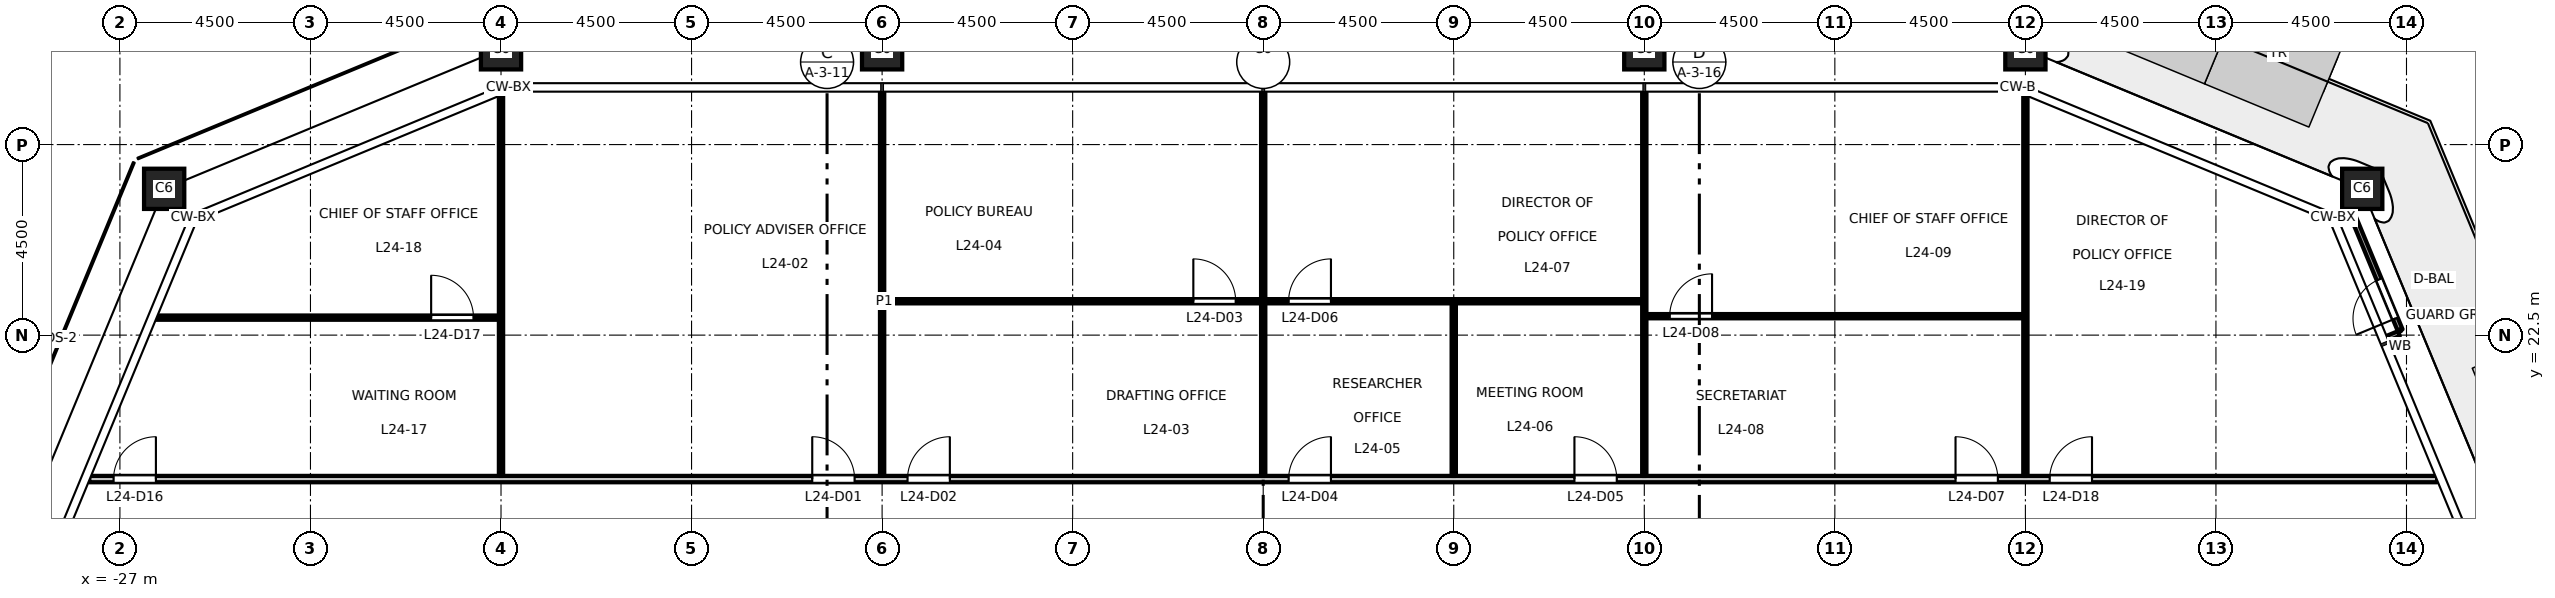
"""IFC4 building model, lengths in metres.
Left out: names, types, materials, properties, quantities, classifications, styles, units other than length and angle.
Written with IfcOpenShell. Run it as: python <this file> out.ifc"""

import sys

from ifc_helpers import new_model, si_unit, direction, frame, frame_2d, origin, origin_2d, place, context, subcontext, project, spatial, rectangle, hollow_rectangle, extrude, element, fill, save


model = new_model("IFC4")
c1 = context("Model", 3, precision=1e-05, world=origin(), true_north=direction((0.0, 1.0)))
c2 = subcontext(c1, "Body", "Model", "MODEL_VIEW")
j1 = project(units=[si_unit("LENGTHUNIT", "METRE"), si_unit("PLANEANGLEUNIT", "RADIAN")], contexts=[c1])
p1 = place(None, origin())
s1 = spatial("IfcSite", under=j1, at=p1, CompositionType="ELEMENT")
p2 = place(p1, origin())
s2 = spatial("IfcBuilding", under=s1, at=p2, CompositionType="ELEMENT")
p3 = place(p2, frame((0.0, 0.0, 113.7)))
s3 = spatial("IfcBuildingStorey", under=s2, at=p3, CompositionType="ELEMENT", Elevation=113.7)
for number, where, z_axis, x_axis in (
    (1, (25.955, 25.955, 0.0), (0.0, 0.0, 1.0), (1.0, 0.0, 0.0)),
    (2, (18.0, 29.25, 0.0), (0.0, 0.0, 1.0), (1.0, 0.0, 0.0)),
    (3, (9.0, 29.25, 0.0), (0.0, 0.0, 1.0), (1.0, 0.0, 0.0)),
    (4, (0.0, 29.25, 0.0), (0.0, 0.0, 1.0), (1.0, 0.0, 0.0)),
    (5, (-9.0, 29.25, 0.0), (0.0, 0.0, 1.0), (1.0, 0.0, 0.0)),
    (6, (-18.0, 29.25, 0.0), (0.0, 0.0, 1.0), (1.0, 0.0, 0.0)),
    (7, (-25.955, 25.955, 0.0), (0.0, 0.0, 1.0), (1.0, 0.0, 0.0)),
):
    element("IfcColumn", number, at=place(p3, frame(where, z_axis=z_axis, x_axis=x_axis)), inside=s3, PredefinedType="COLUMN", context=c2, shape_type="SweptSolid", body=[
        extrude(hollow_rectangle(XDim=0.95, YDim=0.95, WallThickness=0.055, at=origin_2d()), origin(), (0.0, 0.0, 1.0), 4.5),
    ])
for number, where, z_axis, x_axis in (
    (8, (26.551, 22.425, 0.0), (0.0, 0.0, 1.0), (0.924, 0.382, 0.0)),
    (9, (25.421, 25.153, 0.0), (0.0, 0.0, 1.0), (0.924, 0.383, 0.0)),
):
    element("IfcWall", number, at=place(p3, frame(where, z_axis=z_axis, x_axis=x_axis)), inside=s3, PredefinedType="STANDARD", context=c2, shape_type="SweptSolid", body=[
        extrude(rectangle(XDim=0.29, YDim=0.12, at=frame_2d((0.145, 0.0))), origin(), (0.0, 0.0, 1.0), 4.35),
    ])
p4 = place(p3, frame((26.852, 22.615, 0.0), z_axis=(0.0, 0.0, 1.0), x_axis=(-0.382708655389, 0.923869084389, 0.0)))
e10 = element("IfcWall", 10, at=p4, inside=s3, PredefinedType="STANDARD", context=c2, shape_type="SweptSolid", body=[
    extrude(rectangle(XDim=3.102, YDim=0.12, at=frame_2d((1.551, 0.0))), origin(), (0.0, 0.0, 1.0), 4.35),
])
p5 = place(p4, frame((0.3, 0.0, 0.0)))
e11 = element("IfcOpeningElement", 11, at=p5, cuts=e10, PredefinedType="OPENING", context=c2, shape_type="SweptSolid", body=[
    extrude(rectangle(XDim=1.0, YDim=2.4, at=frame_2d((0.5, 1.2))), frame((0.0, 0.07, 0.0), z_axis=(0.0, -1.0, 0.0), x_axis=(1.0, 0.0, 0.0)), (0.0, 0.0, 1.0), 0.14),
])
p6 = place(p3, frame((-27.723, 19.1, 0.0), z_axis=(0.0, 0.0, 1.0), x_axis=(1.0, 0.0, 0.0)))
e12 = element("IfcWall", 12, at=p6, inside=s3, PredefinedType="PARTITIONING", context=c2, shape_type="SweptSolid", body=[
    extrude(rectangle(XDim=55.446, YDim=0.15, at=frame_2d((27.723, 0.0))), origin(), (0.0, 0.0, 1.0), 4.35),
])
p7 = place(p6, frame((17.073, 0.0, 0.0)))
e13 = element("IfcOpeningElement", 13, at=p7, cuts=e12, PredefinedType="OPENING", context=c2, shape_type="SweptSolid", body=[
    extrude(rectangle(XDim=1.0, YDim=2.1, at=frame_2d((0.5, 1.05))), frame((0.0, 0.085, 0.0), z_axis=(0.0, -1.0, 0.0), x_axis=(1.0, 0.0, 0.0)), (0.0, 0.0, 1.0), 0.17),
])
p8 = place(p6, frame((19.323, 0.0, 0.0)))
e14 = element("IfcOpeningElement", 14, at=p8, cuts=e12, PredefinedType="OPENING", context=c2, shape_type="SweptSolid", body=[
    extrude(rectangle(XDim=1.0, YDim=2.1, at=frame_2d((0.5, 1.05))), frame((0.0, 0.085, 0.0), z_axis=(0.0, -1.0, 0.0), x_axis=(1.0, 0.0, 0.0)), (0.0, 0.0, 1.0), 0.17),
])
p9 = place(p6, frame((28.323, 0.0, 0.0)))
e15 = element("IfcOpeningElement", 15, at=p9, cuts=e12, PredefinedType="OPENING", context=c2, shape_type="SweptSolid", body=[
    extrude(rectangle(XDim=1.0, YDim=2.1, at=frame_2d((0.5, 1.05))), frame((0.0, 0.085, 0.0), z_axis=(0.0, -1.0, 0.0), x_axis=(1.0, 0.0, 0.0)), (0.0, 0.0, 1.0), 0.17),
])
p10 = place(p6, frame((35.073, 0.0, 0.0)))
e16 = element("IfcOpeningElement", 16, at=p10, cuts=e12, PredefinedType="OPENING", context=c2, shape_type="SweptSolid", body=[
    extrude(rectangle(XDim=1.0, YDim=2.1, at=frame_2d((0.5, 1.05))), frame((0.0, 0.085, 0.0), z_axis=(0.0, -1.0, 0.0), x_axis=(1.0, 0.0, 0.0)), (0.0, 0.0, 1.0), 0.17),
])
p11 = place(p6, frame((44.073, 0.0, 0.0)))
e17 = element("IfcOpeningElement", 17, at=p11, cuts=e12, PredefinedType="OPENING", context=c2, shape_type="SweptSolid", body=[
    extrude(rectangle(XDim=1.0, YDim=2.1, at=frame_2d((0.5, 1.05))), frame((0.0, 0.085, 0.0), z_axis=(0.0, -1.0, 0.0), x_axis=(1.0, 0.0, 0.0)), (0.0, 0.0, 1.0), 0.17),
])
p12 = place(p6, frame((0.573, 0.0, 0.0)))
e18 = element("IfcOpeningElement", 18, at=p12, cuts=e12, PredefinedType="OPENING", context=c2, shape_type="SweptSolid", body=[
    extrude(rectangle(XDim=1.0, YDim=2.1, at=frame_2d((0.5, 1.05))), frame((0.0, 0.085, 0.0), z_axis=(0.0, -1.0, 0.0), x_axis=(1.0, 0.0, 0.0)), (0.0, 0.0, 1.0), 0.17),
])
p13 = place(p6, frame((46.296, 0.0, 0.0)))
e19 = element("IfcOpeningElement", 19, at=p13, cuts=e12, PredefinedType="OPENING", context=c2, shape_type="SweptSolid", body=[
    extrude(rectangle(XDim=1.0, YDim=2.1, at=frame_2d((0.5, 1.05))), frame((0.0, 0.085, 0.0), z_axis=(0.0, -1.0, 0.0), x_axis=(1.0, 0.0, 0.0)), (0.0, 0.0, 1.0), 0.17),
])
p14 = place(p3, frame((-26.143, 22.913, 0.0), z_axis=(0.0, 0.0, 1.0), x_axis=(1.0, 0.0, 0.0)))
e20 = element("IfcWall", 20, at=p14, inside=s3, PredefinedType="PARTITIONING", context=c2, shape_type="SweptSolid", body=[
    extrude(rectangle(XDim=8.093, YDim=0.1, at=frame_2d((4.046, 0.0))), origin(), (0.0, 0.0, 1.0), 4.35),
])
p15 = place(p14, frame((6.493, 0.0, 0.0)))
e21 = element("IfcOpeningElement", 21, at=p15, cuts=e20, PredefinedType="OPENING", context=c2, shape_type="SweptSolid", body=[
    extrude(rectangle(XDim=1.0, YDim=2.1, at=frame_2d((0.5, 1.05))), frame((0.0, 0.06, 0.0), z_axis=(0.0, -1.0, 0.0), x_axis=(1.0, 0.0, 0.0)), (0.0, 0.0, 1.0), 0.12),
])
p16 = place(p3, frame((9.05, 22.947, 0.0), z_axis=(0.0, 0.0, 1.0), x_axis=(1.0, 0.0, 0.0)))
e22 = element("IfcWall", 22, at=p16, inside=s3, PredefinedType="PARTITIONING", context=c2, shape_type="SweptSolid", body=[
    extrude(rectangle(XDim=8.9, YDim=0.1, at=frame_2d((4.45, 0.0))), origin(), (0.0, 0.0, 1.0), 4.35),
])
p17 = place(p16, frame((0.55, 0.0, 0.0)))
e23 = element("IfcOpeningElement", 23, at=p17, cuts=e22, PredefinedType="OPENING", context=c2, shape_type="SweptSolid", body=[
    extrude(rectangle(XDim=1.0, YDim=2.1, at=frame_2d((0.5, 1.05))), frame((0.0, 0.06, 0.0), z_axis=(0.0, -1.0, 0.0), x_axis=(1.0, 0.0, 0.0)), (0.0, 0.0, 1.0), 0.12),
])
p18 = place(p3, frame((-8.95, 23.3, 0.0), z_axis=(0.0, 0.0, 1.0), x_axis=(1.0, 0.0, 0.0)))
e24 = element("IfcWall", 24, at=p18, inside=s3, PredefinedType="PARTITIONING", context=c2, shape_type="SweptSolid", body=[
    extrude(rectangle(XDim=17.9, YDim=0.1, at=frame_2d((8.95, 0.0))), origin(), (0.0, 0.0, 1.0), 4.35),
])
p19 = place(p18, frame((7.3, 0.0, 0.0)))
e25 = element("IfcOpeningElement", 25, at=p19, cuts=e24, PredefinedType="OPENING", context=c2, shape_type="SweptSolid", body=[
    extrude(rectangle(XDim=1.0, YDim=2.1, at=frame_2d((0.5, 1.05))), frame((0.0, 0.06, 0.0), z_axis=(0.0, -1.0, 0.0), x_axis=(1.0, 0.0, 0.0)), (0.0, 0.0, 1.0), 0.12),
])
p20 = place(p18, frame((9.55, 0.0, 0.0)))
e26 = element("IfcOpeningElement", 26, at=p20, cuts=e24, PredefinedType="OPENING", context=c2, shape_type="SweptSolid", body=[
    extrude(rectangle(XDim=1.0, YDim=2.1, at=frame_2d((0.5, 1.05))), frame((0.0, 0.06, 0.0), z_axis=(0.0, -1.0, 0.0), x_axis=(1.0, 0.0, 0.0)), (0.0, 0.0, 1.0), 0.12),
])
p21 = place(p3, frame((-18.0, 19.175, 0.0), z_axis=(0.0, 0.0, 1.0), x_axis=(0.0, 1.0, 0.0)))
e27 = element("IfcWall", 27, at=p21, inside=s3, PredefinedType="PARTITIONING", context=c2, shape_type="SweptSolid", body=[
    extrude(rectangle(XDim=9.003, YDim=0.1, at=frame_2d((4.501, 0.0))), origin(), (0.0, 0.0, 1.0), 3.45),
])
p22 = place(p3, frame((-9.0, 19.175, 0.0), z_axis=(0.0, 0.0, 1.0), x_axis=(0.0, 1.0, 0.0)))
e28 = element("IfcWall", 28, at=p22, inside=s3, PredefinedType="PARTITIONING", context=c2, shape_type="SweptSolid", body=[
    extrude(rectangle(XDim=9.085, YDim=0.1, at=frame_2d((4.542, 0.0))), origin(), (0.0, 0.0, 1.0), 3.45),
])
p23 = place(p3, frame((0.0, 19.175, 0.0), z_axis=(0.0, 0.0, 1.0), x_axis=(0.0, 1.0, 0.0)))
e29 = element("IfcWall", 29, at=p23, inside=s3, PredefinedType="PARTITIONING", context=c2, shape_type="SweptSolid", body=[
    extrude(rectangle(XDim=4.075, YDim=0.1, at=frame_2d((2.038, 0.0))), origin(), (0.0, 0.0, 1.0), 3.45),
])
p24 = place(p3, frame((0.0, 23.35, 0.0), z_axis=(0.0, 0.0, 1.0), x_axis=(0.0, 1.0, 0.0)))
e30 = element("IfcWall", 30, at=p24, inside=s3, PredefinedType="PARTITIONING", context=c2, shape_type="SweptSolid", body=[
    extrude(rectangle(XDim=4.91, YDim=0.1, at=frame_2d((2.455, 0.0))), origin(), (0.0, 0.0, 1.0), 3.45),
])
p25 = place(p3, frame((4.5, 19.175, 0.0), z_axis=(0.0, 0.0, 1.0), x_axis=(0.0, 1.0, 0.0)))
e31 = element("IfcWall", 31, at=p25, inside=s3, PredefinedType="PARTITIONING", context=c2, shape_type="SweptSolid", body=[
    extrude(rectangle(XDim=4.075, YDim=0.1, at=frame_2d((2.038, 0.0))), origin(), (0.0, 0.0, 1.0), 4.35),
])
p26 = place(p3, frame((9.0, 19.175, 0.0), z_axis=(0.0, 0.0, 1.0), x_axis=(0.0, 1.0, 0.0)))
e32 = element("IfcWall", 32, at=p26, inside=s3, PredefinedType="PARTITIONING", context=c2, shape_type="SweptSolid", body=[
    extrude(rectangle(XDim=9.085, YDim=0.1, at=frame_2d((4.542, 0.0))), origin(), (0.0, 0.0, 1.0), 3.45),
])
p27 = place(p3, frame((18.0, 19.175, 0.0), z_axis=(0.0, 0.0, 1.0), x_axis=(0.0, 1.0, 0.0)))
e33 = element("IfcWall", 33, at=p27, inside=s3, PredefinedType="PARTITIONING", context=c2, shape_type="SweptSolid", body=[
    extrude(rectangle(XDim=9.003, YDim=0.1, at=frame_2d((4.501, 0.0))), origin(), (0.0, 0.0, 1.0), 3.45),
])
p28 = place(p5, origin())
e34 = element("IfcDoor", 34, at=p28, inside=s3, OperationType="SINGLE_SWING_LEFT", PredefinedType="DOOR", context=c2, shape_type="SweptSolid", body=[
    extrude(rectangle(XDim=1.0, YDim=2.4, at=frame_2d((0.5, 1.2))), frame((0.0, 0.025, 0.0), z_axis=(0.0, -1.0, 0.0), x_axis=(1.0, 0.0, 0.0)), (0.0, 0.0, 1.0), 0.05),
])
fill(e11, e34)
p29 = place(p7, origin())
e35 = element("IfcDoor", 35, at=p29, inside=s3, OperationType="SINGLE_SWING_LEFT", PredefinedType="DOOR", context=c2, shape_type="SweptSolid", body=[
    extrude(rectangle(XDim=1.0, YDim=2.1, at=frame_2d((0.5, 1.05))), frame((0.0, 0.025, 0.0), z_axis=(0.0, -1.0, 0.0), x_axis=(1.0, 0.0, 0.0)), (0.0, 0.0, 1.0), 0.05),
])
fill(e13, e35)
p30 = place(p8, origin())
e36 = element("IfcDoor", 36, at=p30, inside=s3, OperationType="SINGLE_SWING_RIGHT", PredefinedType="DOOR", context=c2, shape_type="SweptSolid", body=[
    extrude(rectangle(XDim=1.0, YDim=2.1, at=frame_2d((0.5, 1.05))), frame((0.0, 0.025, 0.0), z_axis=(0.0, -1.0, 0.0), x_axis=(1.0, 0.0, 0.0)), (0.0, 0.0, 1.0), 0.05),
])
fill(e14, e36)
p31 = place(p19, origin())
e37 = element("IfcDoor", 37, at=p31, inside=s3, OperationType="SINGLE_SWING_LEFT", PredefinedType="DOOR", context=c2, shape_type="SweptSolid", body=[
    extrude(rectangle(XDim=1.0, YDim=2.1, at=frame_2d((0.5, 1.05))), frame((0.0, 0.025, 0.0), z_axis=(0.0, -1.0, 0.0), x_axis=(1.0, 0.0, 0.0)), (0.0, 0.0, 1.0), 0.05),
])
fill(e25, e37)
p32 = place(p9, origin())
e38 = element("IfcDoor", 38, at=p32, inside=s3, OperationType="SINGLE_SWING_RIGHT", PredefinedType="DOOR", context=c2, shape_type="SweptSolid", body=[
    extrude(rectangle(XDim=1.0, YDim=2.1, at=frame_2d((0.5, 1.05))), frame((0.0, 0.025, 0.0), z_axis=(0.0, -1.0, 0.0), x_axis=(1.0, 0.0, 0.0)), (0.0, 0.0, 1.0), 0.05),
])
fill(e15, e38)
p33 = place(p10, origin())
e39 = element("IfcDoor", 39, at=p33, inside=s3, OperationType="SINGLE_SWING_LEFT", PredefinedType="DOOR", context=c2, shape_type="SweptSolid", body=[
    extrude(rectangle(XDim=1.0, YDim=2.1, at=frame_2d((0.5, 1.05))), frame((0.0, 0.025, 0.0), z_axis=(0.0, -1.0, 0.0), x_axis=(1.0, 0.0, 0.0)), (0.0, 0.0, 1.0), 0.05),
])
fill(e16, e39)
p34 = place(p20, origin())
e40 = element("IfcDoor", 40, at=p34, inside=s3, OperationType="SINGLE_SWING_RIGHT", PredefinedType="DOOR", context=c2, shape_type="SweptSolid", body=[
    extrude(rectangle(XDim=1.0, YDim=2.1, at=frame_2d((0.5, 1.05))), frame((0.0, 0.025, 0.0), z_axis=(0.0, -1.0, 0.0), x_axis=(1.0, 0.0, 0.0)), (0.0, 0.0, 1.0), 0.05),
])
fill(e26, e40)
p35 = place(p11, origin())
e41 = element("IfcDoor", 41, at=p35, inside=s3, OperationType="SINGLE_SWING_LEFT", PredefinedType="DOOR", context=c2, shape_type="SweptSolid", body=[
    extrude(rectangle(XDim=1.0, YDim=2.1, at=frame_2d((0.5, 1.05))), frame((0.0, 0.025, 0.0), z_axis=(0.0, -1.0, 0.0), x_axis=(1.0, 0.0, 0.0)), (0.0, 0.0, 1.0), 0.05),
])
fill(e17, e41)
p36 = place(p17, origin())
e42 = element("IfcDoor", 42, at=p36, inside=s3, OperationType="SINGLE_SWING_RIGHT", PredefinedType="DOOR", context=c2, shape_type="SweptSolid", body=[
    extrude(rectangle(XDim=1.0, YDim=2.1, at=frame_2d((0.5, 1.05))), frame((0.0, 0.025, 0.0), z_axis=(0.0, -1.0, 0.0), x_axis=(1.0, 0.0, 0.0)), (0.0, 0.0, 1.0), 0.05),
])
fill(e23, e42)
p37 = place(p12, origin())
e43 = element("IfcDoor", 43, at=p37, inside=s3, OperationType="SINGLE_SWING_RIGHT", PredefinedType="DOOR", context=c2, shape_type="SweptSolid", body=[
    extrude(rectangle(XDim=1.0, YDim=2.1, at=frame_2d((0.5, 1.05))), frame((0.0, 0.025, 0.0), z_axis=(0.0, -1.0, 0.0), x_axis=(1.0, 0.0, 0.0)), (0.0, 0.0, 1.0), 0.05),
])
fill(e18, e43)
p38 = place(p15, origin())
e44 = element("IfcDoor", 44, at=p38, inside=s3, OperationType="SINGLE_SWING_LEFT", PredefinedType="DOOR", context=c2, shape_type="SweptSolid", body=[
    extrude(rectangle(XDim=1.0, YDim=2.1, at=frame_2d((0.5, 1.05))), frame((0.0, 0.025, 0.0), z_axis=(0.0, -1.0, 0.0), x_axis=(1.0, 0.0, 0.0)), (0.0, 0.0, 1.0), 0.05),
])
fill(e21, e44)
p39 = place(p13, origin())
e45 = element("IfcDoor", 45, at=p39, inside=s3, OperationType="SINGLE_SWING_RIGHT", PredefinedType="DOOR", context=c2, shape_type="SweptSolid", body=[
    extrude(rectangle(XDim=1.0, YDim=2.1, at=frame_2d((0.5, 1.05))), frame((0.0, 0.025, 0.0), z_axis=(0.0, -1.0, 0.0), x_axis=(1.0, 0.0, 0.0)), (0.0, 0.0, 1.0), 0.05),
])
fill(e19, e45)
save(model, sys.argv[1])
